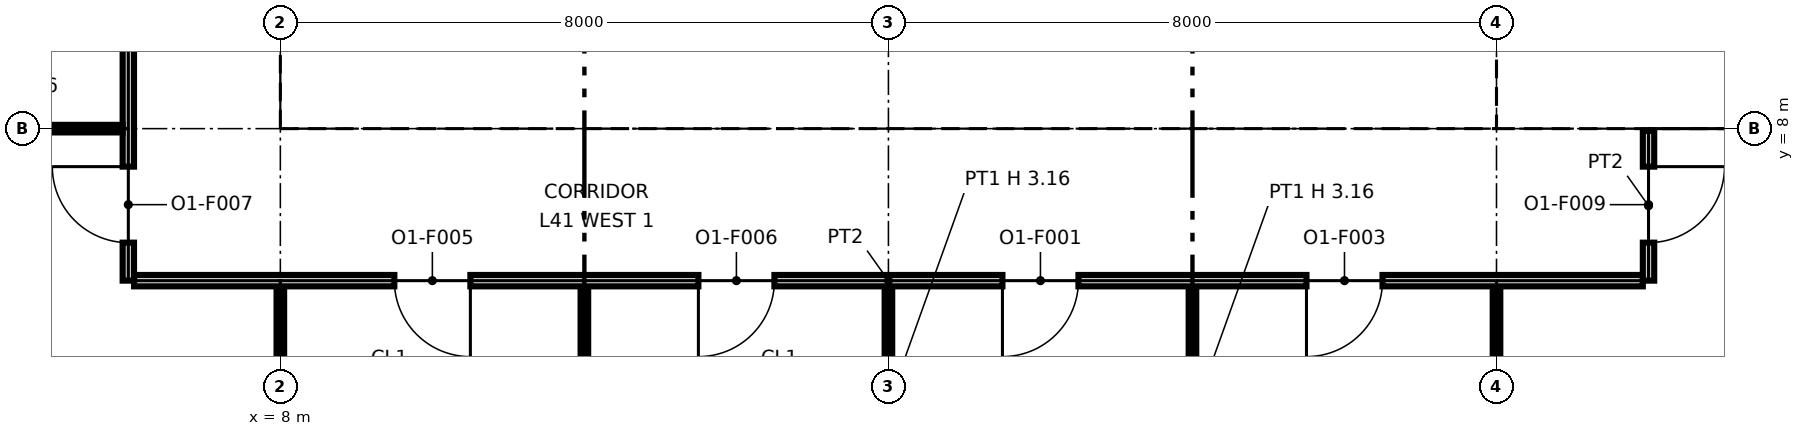
"""IFC4 building model, lengths in metres.
Left out: names, types, materials, properties, quantities, classifications, styles, units other than length and angle.
Written with IfcOpenShell. Run it as: python <this file> out.ifc"""

import sys

from ifc_helpers import new_model, si_unit, direction, frame, frame_2d, origin, origin_2d, place, context, subcontext, project, spatial, polyline, rectangle, i_section, outline, extrude, element, fill, save


model = new_model("IFC4")
c1 = context("Model", 3, precision=1e-05, world=origin(), true_north=direction((0.0, 1.0)))
c2 = subcontext(c1, "Body", "Model", "MODEL_VIEW")
j1 = project(units=[si_unit("LENGTHUNIT", "METRE"), si_unit("PLANEANGLEUNIT", "RADIAN")], contexts=[c1])
p1 = place(None, origin())
s1 = spatial("IfcSite", under=j1, at=p1, CompositionType="ELEMENT")
p2 = place(p1, origin())
s2 = spatial("IfcBuilding", under=s1, at=p2, CompositionType="ELEMENT")
p3 = place(p2, frame((0.0, 0.0, 197.0)))
s3 = spatial("IfcBuildingStorey", under=s2, at=p3, CompositionType="ELEMENT", Elevation=197.0)
for number, where, z_axis, x_axis in (
    (1, (8.0, 8.0, 0.0), (0.0, 0.0, 1.0), (1.0, 0.0, 0.0)),
    (2, (16.0, 8.0, 0.0), (0.0, 0.0, 1.0), (1.0, 0.0, 0.0)),
):
    element("IfcColumn", number, at=place(p3, frame(where, z_axis=z_axis, x_axis=x_axis)), inside=s3, PredefinedType="COLUMN", context=c2, shape_type="SweptSolid", body=[
        extrude(i_section(OverallWidth=0.394, OverallDepth=0.376, WebThickness=0.017, FlangeThickness=0.028, at=origin_2d()), origin(), (0.0, 0.0, 1.0), 3.85),
    ])
p4 = place(p3, frame((24.0, 8.0, 0.0), z_axis=(0.0, 0.0, 1.0), x_axis=(1.0, 0.0, 0.0)))
e3 = element("IfcColumn", 3, at=p4, inside=s3, PredefinedType="COLUMN", context=c2, shape_type="SweptSolid", body=[
    extrude(i_section(OverallWidth=0.399, OverallDepth=0.386, WebThickness=0.021, FlangeThickness=0.033, at=origin_2d()), origin(), (0.0, 0.0, 1.0), 3.85),
])
p5 = place(p3, frame((8.65, 8.75, 0.0), z_axis=(0.0, 0.0, 1.0), x_axis=(1.0, 0.0, 0.0)))
e4 = element("IfcWall", 4, at=p5, inside=s3, PredefinedType="PARTITIONING", context=c2, shape_type="SweptSolid", body=[
    extrude(outline(polyline([(0.0, 0.0), (14.7, 0.0), (14.7, 3.85), (7.469, 3.85), (7.468, 3.242), (7.232, 3.242), (7.231, 3.85), (0.0, 3.85), (0.0, 0.0)])), frame((0.0, 0.1, 0.0), z_axis=(0.0, -1.0, 0.0), x_axis=(1.0, 0.0, 0.0)), (0.0, 0.0, 1.0), 0.2),
])
p6 = place(p5, frame((1.3, 0.0, 0.0)))
e5 = element("IfcOpeningElement", 5, at=p6, cuts=e4, PredefinedType="OPENING", context=c2, shape_type="SweptSolid", body=[
    extrude(rectangle(XDim=1.4, YDim=2.1, at=frame_2d((0.7, 1.05))), frame((0.0, 0.11, 0.0), z_axis=(0.0, -1.0, 0.0), x_axis=(1.0, 0.0, 0.0)), (0.0, 0.0, 1.0), 0.22),
])
p7 = place(p5, frame((4.6, 0.0, 0.0)))
e6 = element("IfcOpeningElement", 6, at=p7, cuts=e4, PredefinedType="OPENING", context=c2, shape_type="SweptSolid", body=[
    extrude(rectangle(XDim=1.4, YDim=2.1, at=frame_2d((0.7, 1.05))), frame((0.0, 0.11, 0.0), z_axis=(0.0, -1.0, 0.0), x_axis=(1.0, 0.0, 0.0)), (0.0, 0.0, 1.0), 0.22),
])
p8 = place(p5, frame((10.4, 0.0, 0.0)))
e7 = element("IfcOpeningElement", 7, at=p8, cuts=e4, PredefinedType="OPENING", context=c2, shape_type="SweptSolid", body=[
    extrude(rectangle(XDim=1.2, YDim=2.1, at=frame_2d((0.6, 1.05))), frame((0.0, 0.11, 0.0), z_axis=(0.0, -1.0, 0.0), x_axis=(1.0, 0.0, 0.0)), (0.0, 0.0, 1.0), 0.22),
])
p9 = place(p3, frame((8.75, 8.85, 0.0), z_axis=(0.0, 0.0, 1.0), x_axis=(0.0, 1.0, 0.0)))
e8 = element("IfcWall", 8, at=p9, inside=s3, PredefinedType="PARTITIONING", context=c2, shape_type="SweptSolid", body=[
    extrude(outline(polyline([(0.0, 0.0), (14.3, 0.0), (14.3, 3.85), (10.231, 3.85), (10.23, 3.389), (10.07, 3.389), (10.069, 3.85), (7.269, 3.85), (7.268, 3.242), (7.032, 3.242), (7.031, 3.85), (0.0, 3.85), (0.0, 0.0)])), frame((0.0, 0.1, 0.0), z_axis=(0.0, -1.0, 0.0), x_axis=(1.0, 0.0, 0.0)), (0.0, 0.0, 1.0), 0.2),
])
p10 = place(p9, frame((8.3, 0.0, 0.0)))
e9 = element("IfcOpeningElement", 9, at=p10, cuts=e8, PredefinedType="OPENING", context=c2, shape_type="SweptSolid", body=[
    extrude(rectangle(XDim=1.8, YDim=2.1, at=frame_2d((0.9, 1.05))), frame((0.0, 0.11, 0.0), z_axis=(0.0, -1.0, 0.0), x_axis=(1.0, 0.0, 0.0)), (0.0, 0.0, 1.0), 0.22),
])
p11 = place(p3, frame((12.4, 8.85, 0.0), z_axis=(0.0, 0.0, 1.0), x_axis=(0.0, 1.0, 0.0)))
e10 = element("IfcWall", 10, at=p11, inside=s3, PredefinedType="PARTITIONING", context=c2, shape_type="SweptSolid", body=[
    extrude(rectangle(XDim=6.85, YDim=0.2, at=frame_2d((3.425, 0.0))), origin(), (0.0, 0.0, 1.0), 3.85),
])
p12 = place(p3, frame((15.85, 8.85, 0.0), z_axis=(0.0, 0.0, 1.0), x_axis=(0.0, 1.0, 0.0)))
e11 = element("IfcWall", 11, at=p12, inside=s3, PredefinedType="PARTITIONING", context=c2, shape_type="SweptSolid", body=[
    extrude(rectangle(XDim=1.55, YDim=0.9, at=frame_2d((0.775, 0.0))), origin(), (0.0, 0.0, 1.0), 3.242),
])
p13 = place(p12, frame((0.3, 0.0, 0.0)))
e12 = element("IfcOpeningElement", 12, at=p13, cuts=e11, PredefinedType="OPENING", context=c2, shape_type="SweptSolid", body=[
    extrude(rectangle(XDim=1.1, YDim=2.1, at=frame_2d((0.55, 1.05))), frame((0.0, 0.46, 0.0), z_axis=(0.0, -1.0, 0.0), x_axis=(1.0, 0.0, 0.0)), (0.0, 0.0, 1.0), 0.92),
])
p14 = place(p3, frame((23.25, 8.85, 0.0), z_axis=(0.0, 0.0, 1.0), x_axis=(0.0, 1.0, 0.0)))
e13 = element("IfcWall", 13, at=p14, inside=s3, PredefinedType="PARTITIONING", context=c2, shape_type="SweptSolid", body=[
    extrude(outline(polyline([(0.0, 0.0), (14.3, 0.0), (14.3, 3.85), (10.231, 3.85), (10.23, 3.389), (10.07, 3.389), (10.069, 3.85), (7.269, 3.85), (7.268, 3.242), (7.032, 3.242), (7.031, 3.85), (5.231, 3.85), (5.23, 3.389), (5.07, 3.389), (5.069, 3.85), (0.0, 3.85), (0.0, 0.0)])), frame((0.0, 0.1, 0.0), z_axis=(0.0, -1.0, 0.0), x_axis=(1.0, 0.0, 0.0)), (0.0, 0.0, 1.0), 0.2),
])
p15 = place(p14, frame((8.3, 0.0, 0.0)))
e14 = element("IfcOpeningElement", 14, at=p15, cuts=e13, PredefinedType="OPENING", context=c2, shape_type="SweptSolid", body=[
    extrude(rectangle(XDim=1.8, YDim=2.1, at=frame_2d((0.9, 1.05))), frame((0.0, 0.11, 0.0), z_axis=(0.0, -1.0, 0.0), x_axis=(1.0, 0.0, 0.0)), (0.0, 0.0, 1.0), 0.22),
])
p16 = place(p3, frame((24.65, 8.75, 0.0), z_axis=(0.0, 0.0, 1.0), x_axis=(1.0, 0.0, 0.0)))
e15 = element("IfcWall", 15, at=p16, inside=s3, PredefinedType="PARTITIONING", context=c2, shape_type="SweptSolid", body=[
    extrude(outline(polyline([(0.0, 0.0), (14.7, 0.0), (14.7, 3.85), (7.469, 3.85), (7.468, 3.242), (7.232, 3.242), (7.231, 3.85), (0.0, 3.85), (0.0, 0.0)])), frame((0.0, 0.1, 0.0), z_axis=(0.0, -1.0, 0.0), x_axis=(1.0, 0.0, 0.0)), (0.0, 0.0, 1.0), 0.2),
])
p17 = place(p3, frame((24.75, 8.85, 0.0), z_axis=(0.0, 0.0, 1.0), x_axis=(0.0, 1.0, 0.0)))
e16 = element("IfcWall", 16, at=p17, inside=s3, PredefinedType="PARTITIONING", context=c2, shape_type="SweptSolid", body=[
    extrude(outline(polyline([(0.0, 0.0), (6.3, 0.0), (6.3, 3.85), (3.231, 3.85), (3.23, 3.389), (3.07, 3.389), (3.069, 3.85), (0.0, 3.85), (0.0, 0.0)])), frame((0.0, 0.1, 0.0), z_axis=(0.0, -1.0, 0.0), x_axis=(1.0, 0.0, 0.0)), (0.0, 0.0, 1.0), 0.2),
])
p18 = place(p3, frame((20.0, 2.5, 0.0), z_axis=(0.0, 0.0, 1.0), x_axis=(0.0, 1.0, 0.0)))
e17 = element("IfcWall", 17, at=p18, inside=s3, PredefinedType="PARTITIONING", context=c2, shape_type="SweptSolid", body=[
    extrude(rectangle(XDim=3.425, YDim=0.1, at=frame_2d((1.712, 0.0))), origin(), (0.0, 0.0, 1.0), 3.157),
])
for number, where, z_axis, x_axis in (
    (18, (12.0, 2.83, 0.0), (0.0, 0.0, 1.0), (0.0, 1.0, 0.0)),
    (19, (16.0, 2.83, 0.0), (0.0, 0.0, 1.0), (0.0, 1.0, 0.0)),
    (20, (24.0, 2.83, 0.0), (0.0, 0.0, 1.0), (0.0, 1.0, 0.0)),
):
    element("IfcWall", number, at=place(p3, frame(where, z_axis=z_axis, x_axis=x_axis)), inside=s3, PredefinedType="PARTITIONING", context=c2, shape_type="SweptSolid", body=[
        extrude(rectangle(XDim=3.095, YDim=0.1, at=frame_2d((1.547, 0.0))), origin(), (0.0, 0.0, 1.0), 3.157),
    ])
p19 = place(p3, frame((8.0, 3.5, 0.0), z_axis=(0.0, 0.0, 1.0), x_axis=(0.0, 1.0, 0.0)))
e21 = element("IfcWall", 21, at=p19, inside=s3, PredefinedType="PARTITIONING", context=c2, shape_type="SweptSolid", body=[
    extrude(rectangle(XDim=2.425, YDim=0.1, at=frame_2d((1.212, 0.0))), origin(), (0.0, 0.0, 1.0), 3.157),
])
p20 = place(p3, frame((6.075, 6.0, 0.0), z_axis=(0.0, 0.0, 1.0), x_axis=(1.0, 0.0, 0.0)))
e22 = element("IfcWall", 22, at=p20, inside=s3, PredefinedType="PARTITIONING", context=c2, shape_type="SweptSolid", body=[
    extrude(rectangle(XDim=19.85, YDim=0.15, at=frame_2d((9.925, 0.0))), origin(), (0.0, 0.0, 1.0), 3.85),
])
p21 = place(p20, frame((12.425, 0.0, 0.0), z_axis=(0.0, 0.0, 1.0), x_axis=(-1.0, 0.0, 0.0)))
e23 = element("IfcOpeningElement", 23, at=p21, cuts=e22, PredefinedType="OPENING", context=c2, shape_type="SweptSolid", body=[
    extrude(rectangle(XDim=1.0, YDim=2.1, at=frame_2d((0.5, 1.05))), frame((0.0, 0.085, 0.0), z_axis=(0.0, -1.0, 0.0), x_axis=(1.0, 0.0, 0.0)), (0.0, 0.0, 1.0), 0.17),
])
p22 = place(p20, frame((16.425, 0.0, 0.0), z_axis=(0.0, 0.0, 1.0), x_axis=(-1.0, 0.0, 0.0)))
e24 = element("IfcOpeningElement", 24, at=p22, cuts=e22, PredefinedType="OPENING", context=c2, shape_type="SweptSolid", body=[
    extrude(rectangle(XDim=1.0, YDim=2.1, at=frame_2d((0.5, 1.05))), frame((0.0, 0.085, 0.0), z_axis=(0.0, -1.0, 0.0), x_axis=(1.0, 0.0, 0.0)), (0.0, 0.0, 1.0), 0.17),
])
p23 = place(p20, frame((4.425, 0.0, 0.0), z_axis=(0.0, 0.0, 1.0), x_axis=(-1.0, 0.0, 0.0)))
e25 = element("IfcOpeningElement", 25, at=p23, cuts=e22, PredefinedType="OPENING", context=c2, shape_type="SweptSolid", body=[
    extrude(rectangle(XDim=1.0, YDim=2.1, at=frame_2d((0.5, 1.05))), frame((0.0, 0.085, 0.0), z_axis=(0.0, -1.0, 0.0), x_axis=(1.0, 0.0, 0.0)), (0.0, 0.0, 1.0), 0.17),
])
p24 = place(p20, frame((8.425, 0.0, 0.0), z_axis=(0.0, 0.0, 1.0), x_axis=(-1.0, 0.0, 0.0)))
e26 = element("IfcOpeningElement", 26, at=p24, cuts=e22, PredefinedType="OPENING", context=c2, shape_type="SweptSolid", body=[
    extrude(rectangle(XDim=1.0, YDim=2.1, at=frame_2d((0.5, 1.05))), frame((0.0, 0.085, 0.0), z_axis=(0.0, -1.0, 0.0), x_axis=(1.0, 0.0, 0.0)), (0.0, 0.0, 1.0), 0.17),
])
p25 = place(p3, frame((6.0, 6.0, 0.0), z_axis=(0.0, 0.0, 1.0), x_axis=(0.0, 1.0, 0.0)))
e27 = element("IfcWall", 27, at=p25, inside=s3, PredefinedType="PARTITIONING", context=c2, shape_type="SweptSolid", body=[
    extrude(outline(polyline([(0.0, 0.0), (15.87, 0.0), (15.87, 3.85), (14.3, 3.85), (14.298, 3.157), (13.702, 3.157), (13.7, 3.85), (10.3, 3.85), (10.298, 3.157), (9.702, 3.157), (9.7, 3.85), (6.3, 3.85), (6.298, 3.157), (5.702, 3.157), (5.7, 3.85), (2.3, 3.85), (2.298, 3.157), (1.702, 3.157), (1.7, 3.85), (0.0, 3.85), (0.0, 0.0)])), frame((0.0, 0.075, 0.0), z_axis=(0.0, -1.0, 0.0), x_axis=(1.0, 0.0, 0.0)), (0.0, 0.0, 1.0), 0.15),
])
p26 = place(p25, frame((0.5, 0.0, 0.0)))
e28 = element("IfcOpeningElement", 28, at=p26, cuts=e27, PredefinedType="OPENING", context=c2, shape_type="SweptSolid", body=[
    extrude(rectangle(XDim=1.0, YDim=2.1, at=frame_2d((0.5, 1.05))), frame((0.0, 0.085, 0.0), z_axis=(0.0, -1.0, 0.0), x_axis=(1.0, 0.0, 0.0)), (0.0, 0.0, 1.0), 0.17),
])
p27 = place(p25, frame((3.5, 0.0, 0.0)))
e29 = element("IfcOpeningElement", 29, at=p27, cuts=e27, PredefinedType="OPENING", context=c2, shape_type="SweptSolid", body=[
    extrude(rectangle(XDim=1.0, YDim=2.1, at=frame_2d((0.5, 1.05))), frame((0.0, 0.085, 0.0), z_axis=(0.0, -1.0, 0.0), x_axis=(1.0, 0.0, 0.0)), (0.0, 0.0, 1.0), 0.17),
])
p28 = place(p25, frame((7.5, 0.0, 0.0)))
e30 = element("IfcOpeningElement", 30, at=p28, cuts=e27, PredefinedType="OPENING", context=c2, shape_type="SweptSolid", body=[
    extrude(rectangle(XDim=1.0, YDim=2.1, at=frame_2d((0.5, 1.05))), frame((0.0, 0.085, 0.0), z_axis=(0.0, -1.0, 0.0), x_axis=(1.0, 0.0, 0.0)), (0.0, 0.0, 1.0), 0.17),
])
p29 = place(p25, frame((11.225, 0.0, 0.0)))
e31 = element("IfcOpeningElement", 31, at=p29, cuts=e27, PredefinedType="OPENING", context=c2, shape_type="SweptSolid", body=[
    extrude(rectangle(XDim=1.0, YDim=2.1, at=frame_2d((0.5, 1.05))), frame((0.0, 0.085, 0.0), z_axis=(0.0, -1.0, 0.0), x_axis=(1.0, 0.0, 0.0)), (0.0, 0.0, 1.0), 0.17),
])
p30 = place(p3, frame((26.0, 6.0, 0.0), z_axis=(0.0, 0.0, 1.0), x_axis=(0.0, 1.0, 0.0)))
e32 = element("IfcWall", 32, at=p30, inside=s3, PredefinedType="PARTITIONING", context=c2, shape_type="SweptSolid", body=[
    extrude(rectangle(XDim=1.97, YDim=0.15, at=frame_2d((0.985, 0.0))), origin(), (0.0, 0.0, 1.0), 3.85),
])
p31 = place(p30, frame((1.5, 0.0, 0.0), z_axis=(0.0, 0.0, 1.0), x_axis=(-1.0, 0.0, 0.0)))
e33 = element("IfcOpeningElement", 33, at=p31, cuts=e32, PredefinedType="OPENING", context=c2, shape_type="SweptSolid", body=[
    extrude(rectangle(XDim=1.0, YDim=2.1, at=frame_2d((0.5, 1.05))), frame((0.0, 0.085, 0.0), z_axis=(0.0, -1.0, 0.0), x_axis=(1.0, 0.0, 0.0)), (0.0, 0.0, 1.0), 0.17),
])
p32 = place(p3, frame((2.83, 8.0, 0.0), z_axis=(0.0, 0.0, 1.0), x_axis=(1.0, 0.0, 0.0)))
e34 = element("IfcWall", 34, at=p32, inside=s3, PredefinedType="PARTITIONING", context=c2, shape_type="SweptSolid", body=[
    extrude(rectangle(XDim=3.095, YDim=0.1, at=frame_2d((1.547, 0.0))), origin(), (0.0, 0.0, 1.0), 3.157),
])
p33 = place(p6, origin())
e35 = element("IfcDoor", 35, at=p33, inside=s3, OperationType="DOUBLE_DOOR_SINGLE_SWING", PredefinedType="NOTDEFINED", context=c2, shape_type="SweptSolid", body=[
    extrude(rectangle(XDim=1.4, YDim=2.1, at=frame_2d((0.7, 1.05))), frame((0.0, 0.025, 0.0), z_axis=(0.0, -1.0, 0.0), x_axis=(1.0, 0.0, 0.0)), (0.0, 0.0, 1.0), 0.05),
])
fill(e5, e35)
p34 = place(p7, origin())
e36 = element("IfcDoor", 36, at=p34, inside=s3, OperationType="DOUBLE_DOOR_SINGLE_SWING", PredefinedType="NOTDEFINED", context=c2, shape_type="SweptSolid", body=[
    extrude(rectangle(XDim=1.4, YDim=2.1, at=frame_2d((0.7, 1.05))), frame((0.0, 0.025, 0.0), z_axis=(0.0, -1.0, 0.0), x_axis=(1.0, 0.0, 0.0)), (0.0, 0.0, 1.0), 0.05),
])
fill(e6, e36)
p35 = place(p8, origin())
e37 = element("IfcDoor", 37, at=p35, inside=s3, OperationType="SINGLE_SWING_RIGHT", PredefinedType="NOTDEFINED", context=c2, shape_type="SweptSolid", body=[
    extrude(rectangle(XDim=1.2, YDim=2.1, at=frame_2d((0.6, 1.05))), frame((0.0, 0.025, 0.0), z_axis=(0.0, -1.0, 0.0), x_axis=(1.0, 0.0, 0.0)), (0.0, 0.0, 1.0), 0.05),
])
fill(e7, e37)
p36 = place(p21, origin())
e38 = element("IfcDoor", 38, at=p36, inside=s3, OperationType="SINGLE_SWING_RIGHT", PredefinedType="DOOR", context=c2, shape_type="SweptSolid", body=[
    extrude(rectangle(XDim=1.0, YDim=2.1, at=frame_2d((0.5, 1.05))), frame((0.0, 0.025, 0.0), z_axis=(0.0, -1.0, 0.0), x_axis=(1.0, 0.0, 0.0)), (0.0, 0.0, 1.0), 0.05),
])
fill(e23, e38)
p37 = place(p22, origin())
e39 = element("IfcDoor", 39, at=p37, inside=s3, OperationType="SINGLE_SWING_RIGHT", PredefinedType="DOOR", context=c2, shape_type="SweptSolid", body=[
    extrude(rectangle(XDim=1.0, YDim=2.1, at=frame_2d((0.5, 1.05))), frame((0.0, 0.025, 0.0), z_axis=(0.0, -1.0, 0.0), x_axis=(1.0, 0.0, 0.0)), (0.0, 0.0, 1.0), 0.05),
])
fill(e24, e39)
p38 = place(p23, origin())
e40 = element("IfcDoor", 40, at=p38, inside=s3, OperationType="SINGLE_SWING_LEFT", PredefinedType="DOOR", context=c2, shape_type="SweptSolid", body=[
    extrude(rectangle(XDim=1.0, YDim=2.1, at=frame_2d((0.5, 1.05))), frame((0.0, 0.025, 0.0), z_axis=(0.0, -1.0, 0.0), x_axis=(1.0, 0.0, 0.0)), (0.0, 0.0, 1.0), 0.05),
])
fill(e25, e40)
p39 = place(p24, origin())
e41 = element("IfcDoor", 41, at=p39, inside=s3, OperationType="SINGLE_SWING_RIGHT", PredefinedType="DOOR", context=c2, shape_type="SweptSolid", body=[
    extrude(rectangle(XDim=1.0, YDim=2.1, at=frame_2d((0.5, 1.05))), frame((0.0, 0.025, 0.0), z_axis=(0.0, -1.0, 0.0), x_axis=(1.0, 0.0, 0.0)), (0.0, 0.0, 1.0), 0.05),
])
fill(e26, e41)
p40 = place(p26, origin())
e42 = element("IfcDoor", 42, at=p40, inside=s3, OperationType="SINGLE_SWING_RIGHT", PredefinedType="DOOR", context=c2, shape_type="SweptSolid", body=[
    extrude(rectangle(XDim=1.0, YDim=2.1, at=frame_2d((0.5, 1.05))), frame((0.0, 0.025, 0.0), z_axis=(0.0, -1.0, 0.0), x_axis=(1.0, 0.0, 0.0)), (0.0, 0.0, 1.0), 0.05),
])
fill(e28, e42)
p41 = place(p31, origin())
e43 = element("IfcDoor", 43, at=p41, inside=s3, OperationType="SINGLE_SWING_LEFT", PredefinedType="DOOR", context=c2, shape_type="SweptSolid", body=[
    extrude(rectangle(XDim=1.0, YDim=2.1, at=frame_2d((0.5, 1.05))), frame((0.0, 0.025, 0.0), z_axis=(0.0, -1.0, 0.0), x_axis=(1.0, 0.0, 0.0)), (0.0, 0.0, 1.0), 0.05),
])
fill(e33, e43)
save(model, sys.argv[1])
